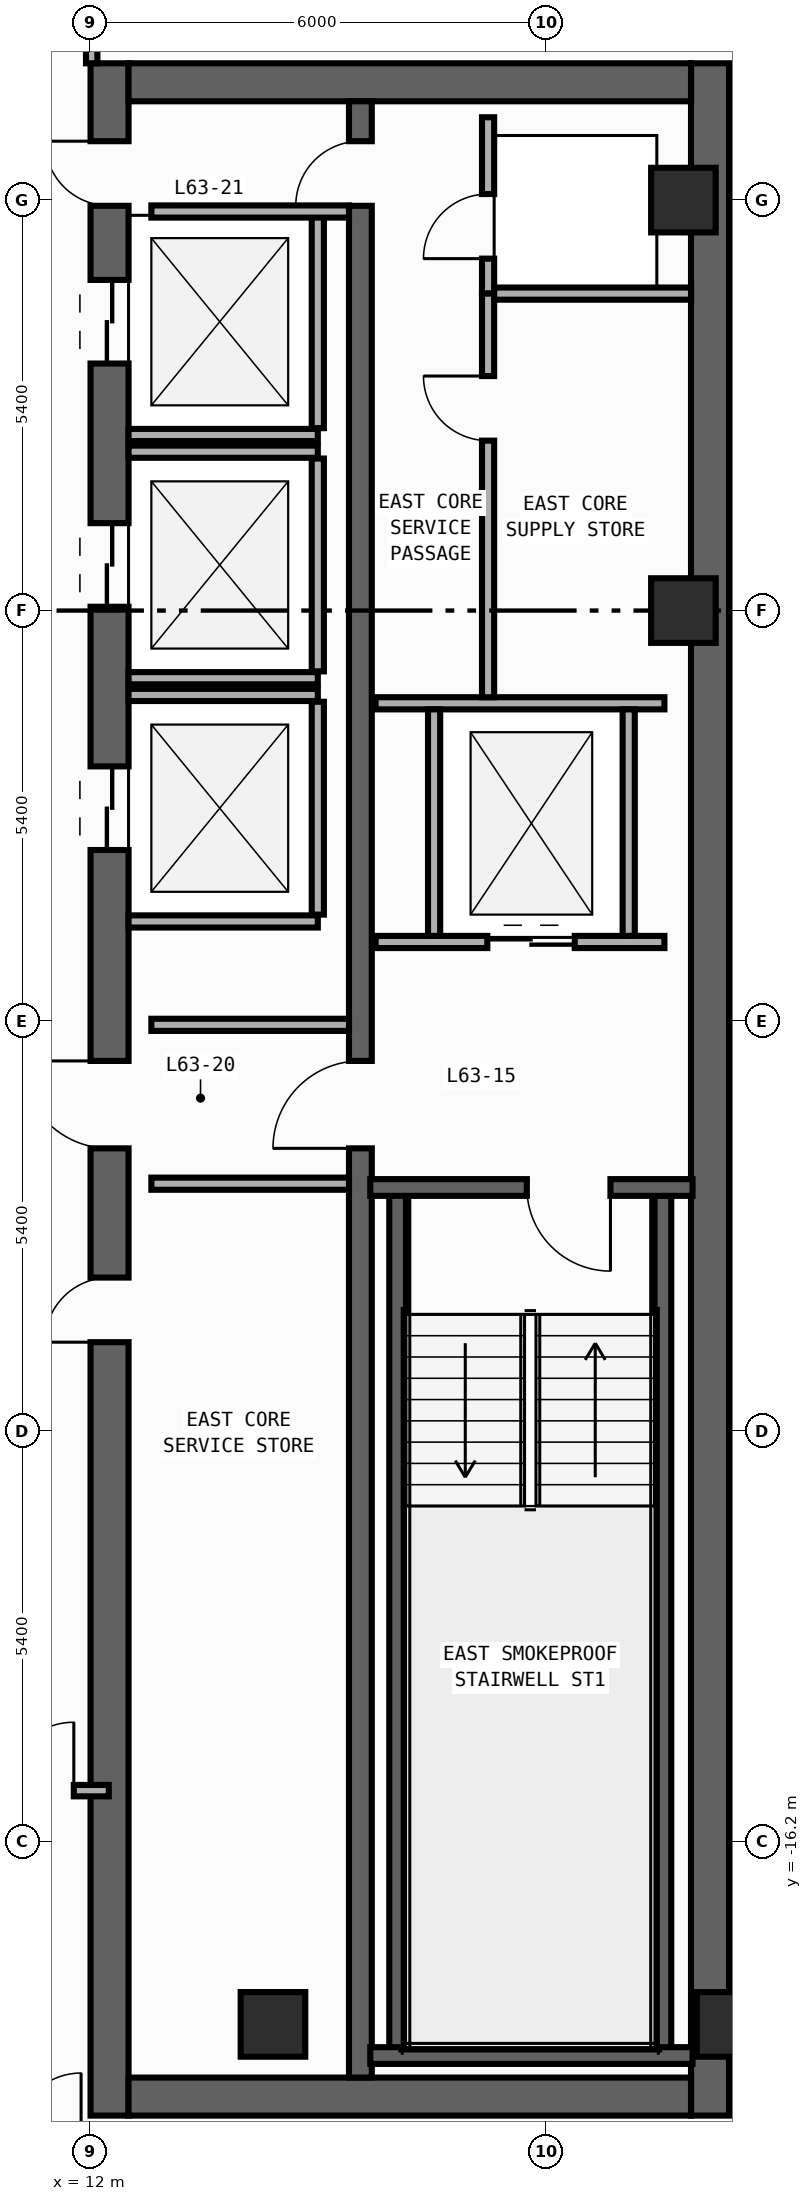
"""IFC4 building model, lengths in metres.
Left out: names, types, materials, properties, quantities, classifications, styles, units other than length and angle.
Written with IfcOpenShell. Run it as: python <this file> out.ifc"""

import sys

from ifc_helpers import new_model, si_unit, direction, frame, frame_2d, origin, origin_2d, place, context, subcontext, project, spatial, rectangle, extrude, element, fill, save


model = new_model("IFC4")
c1 = context("Model", 3, precision=1e-05, world=origin(), true_north=direction((0.0, 1.0)))
c2 = subcontext(c1, "Body", "Model", "MODEL_VIEW")
j1 = project(units=[si_unit("LENGTHUNIT", "METRE"), si_unit("PLANEANGLEUNIT", "RADIAN")], contexts=[c1])
p1 = place(None, origin())
s1 = spatial("IfcSite", under=j1, at=p1, CompositionType="ELEMENT")
p2 = place(p1, origin())
s2 = spatial("IfcBuilding", under=s1, at=p2, CompositionType="ELEMENT")
p3 = place(p2, frame((0.0, 0.0, 265.6)))
s3 = spatial("IfcBuildingStorey", under=s2, at=p3, CompositionType="ELEMENT", Elevation=265.6)
p4 = place(p3, frame((12.25, -19.8, 0.0), z_axis=(0.0, 0.0, 1.0), x_axis=(0.0, 1.0, 0.0)))
e1 = element("IfcWall", 1, at=p4, inside=s3, PredefinedType="SHEAR", context=c2, shape_type="SweptSolid", body=[
    extrude(rectangle(XDim=27.0, YDim=0.5, at=frame_2d((13.5, 0.0))), origin(), (0.0, 0.0, 1.0), 3.34),
])
p5 = place(p4, frame((23.05, 0.0, 0.0)))
e2 = element("IfcOpeningElement", 2, at=p5, cuts=e1, PredefinedType="OPENING", context=c2, shape_type="SweptSolid", body=[
    extrude(rectangle(XDim=1.1, YDim=2.2, at=frame_2d((0.55, 1.1))), frame((0.0, 0.26, 0.0), z_axis=(0.0, -1.0, 0.0), x_axis=(1.0, 0.0, 0.0)), (0.0, 0.0, 1.0), 0.52),
])
p6 = place(p4, frame((19.85, 0.0, 0.0)))
e3 = element("IfcOpeningElement", 3, at=p6, cuts=e1, PredefinedType="OPENING", context=c2, shape_type="SweptSolid", body=[
    extrude(rectangle(XDim=1.1, YDim=2.2, at=frame_2d((0.55, 1.1))), frame((0.0, 0.26, 0.0), z_axis=(0.0, -1.0, 0.0), x_axis=(1.0, 0.0, 0.0)), (0.0, 0.0, 1.0), 0.52),
])
p7 = place(p4, frame((16.65, 0.0, 0.0)))
e4 = element("IfcOpeningElement", 4, at=p7, cuts=e1, PredefinedType="OPENING", context=c2, shape_type="SweptSolid", body=[
    extrude(rectangle(XDim=1.1, YDim=2.2, at=frame_2d((0.55, 1.1))), frame((0.0, 0.26, 0.0), z_axis=(0.0, -1.0, 0.0), x_axis=(1.0, 0.0, 0.0)), (0.0, 0.0, 1.0), 0.52),
])
p8 = place(p4, frame((10.175, 0.0, 0.0)))
e5 = element("IfcOpeningElement", 5, at=p8, cuts=e1, PredefinedType="OPENING", context=c2, shape_type="SweptSolid", body=[
    extrude(rectangle(XDim=0.85, YDim=2.1, at=frame_2d((0.425, 1.05))), frame((0.0, 0.26, 0.0), z_axis=(0.0, -1.0, 0.0), x_axis=(1.0, 0.0, 0.0)), (0.0, 0.0, 1.0), 0.52),
])
p9 = place(p4, frame((12.725, 0.0, 0.0)))
e6 = element("IfcOpeningElement", 6, at=p9, cuts=e1, PredefinedType="OPENING", context=c2, shape_type="SweptSolid", body=[
    extrude(rectangle(XDim=1.15, YDim=2.2, at=frame_2d((0.575, 1.1))), frame((0.0, 0.26, 0.0), z_axis=(0.0, -1.0, 0.0), x_axis=(1.0, 0.0, 0.0)), (0.0, 0.0, 1.0), 0.52),
])
p10 = place(p4, frame((25.125, 0.0, 0.0)))
e7 = element("IfcOpeningElement", 7, at=p10, cuts=e1, PredefinedType="OPENING", context=c2, shape_type="SweptSolid", body=[
    extrude(rectangle(XDim=0.85, YDim=2.1, at=frame_2d((0.425, 1.05))), frame((0.0, 0.26, 0.0), z_axis=(0.0, -1.0, 0.0), x_axis=(1.0, 0.0, 0.0)), (0.0, 0.0, 1.0), 0.52),
])
p11 = place(p3, frame((20.15, -19.8, 0.0), z_axis=(0.0, 0.0, 1.0), x_axis=(0.0, 1.0, 0.0)))
e8 = element("IfcWall", 8, at=p11, inside=s3, PredefinedType="SHEAR", context=c2, shape_type="SweptSolid", body=[
    extrude(rectangle(XDim=27.0, YDim=0.5, at=frame_2d((13.5, 0.0))), origin(), (0.0, 0.0, 1.0), 3.34),
])
for number, where, z_axis, x_axis in (
    (9, (12.5, -19.55, 0.0), (0.0, 0.0, 1.0), (1.0, 0.0, 0.0)),
    (10, (12.5, 6.95, 0.0), (0.0, 0.0, 1.0), (1.0, 0.0, 0.0)),
):
    element("IfcWall", number, at=place(p3, frame(where, z_axis=z_axis, x_axis=x_axis)), inside=s3, PredefinedType="SHEAR", context=c2, shape_type="SweptSolid", body=[
        extrude(rectangle(XDim=7.4, YDim=0.5, at=frame_2d((3.7, 0.0))), origin(), (0.0, 0.0, 1.0), 3.34),
    ])
p12 = place(p3, frame((15.55, -19.3, 0.0), z_axis=(0.0, 0.0, 1.0), x_axis=(0.0, 1.0, 0.0)))
e11 = element("IfcWall", 11, at=p12, inside=s3, PredefinedType="SHEAR", context=c2, shape_type="SweptSolid", body=[
    extrude(rectangle(XDim=26.0, YDim=0.3, at=frame_2d((13.0, 0.0))), origin(), (0.0, 0.0, 1.0), 3.34),
])
p13 = place(p12, frame((12.225, 0.0, 0.0)))
e12 = element("IfcOpeningElement", 12, at=p13, cuts=e11, PredefinedType="OPENING", context=c2, shape_type="SweptSolid", body=[
    extrude(rectangle(XDim=1.15, YDim=2.2, at=frame_2d((0.575, 1.1))), frame((0.0, 0.16, 0.0), z_axis=(0.0, -1.0, 0.0), x_axis=(1.0, 0.0, 0.0)), (0.0, 0.0, 1.0), 0.32),
])
p14 = place(p12, frame((24.625, 0.0, 0.0)))
e13 = element("IfcOpeningElement", 13, at=p14, cuts=e11, PredefinedType="OPENING", context=c2, shape_type="SweptSolid", body=[
    extrude(rectangle(XDim=0.85, YDim=2.1, at=frame_2d((0.425, 1.05))), frame((0.0, 0.16, 0.0), z_axis=(0.0, -1.0, 0.0), x_axis=(1.0, 0.0, 0.0)), (0.0, 0.0, 1.0), 0.32),
])
for number, where, z_axis, x_axis in (
    (14, (16.04, -19.01, 0.0), (0.0, 0.0, 1.0), (0.0, 1.0, 0.0)),
    (15, (19.53, -19.01, 0.0), (0.0, 0.0, 1.0), (0.0, 1.0, 0.0)),
):
    element("IfcWall", number, at=place(p3, frame(where, z_axis=z_axis, x_axis=x_axis)), inside=s3, PredefinedType="SHEAR", context=c2, shape_type="SweptSolid", body=[
        extrude(rectangle(XDim=11.42, YDim=0.22, at=frame_2d((5.71, 0.0))), origin(), (0.0, 0.0, 1.0), 3.34),
    ])
p15 = place(p3, frame((15.68, -19.01, 0.0), z_axis=(0.0, 0.0, 1.0), x_axis=(1.0, 0.0, 0.0)))
e16 = element("IfcWall", 16, at=p15, inside=s3, PredefinedType="SHEAR", context=c2, shape_type="SweptSolid", body=[
    extrude(rectangle(XDim=4.24, YDim=0.22, at=frame_2d((2.12, 0.0))), origin(), (0.0, 0.0, 1.0), 3.34),
])
p16 = place(p3, frame((19.92, -7.59, 0.0), z_axis=(0.0, 0.0, 1.0), x_axis=(-1.0, 0.0, 0.0)))
e17 = element("IfcWall", 17, at=p16, inside=s3, PredefinedType="SHEAR", context=c2, shape_type="SweptSolid", body=[
    extrude(rectangle(XDim=4.24, YDim=0.22, at=frame_2d((2.12, 0.0))), origin(), (0.0, 0.0, 1.0), 3.34),
])
p17 = place(p16, frame((1.08, 0.0, 0.0)))
e18 = element("IfcOpeningElement", 18, at=p17, cuts=e17, PredefinedType="OPENING", context=c2, shape_type="SweptSolid", body=[
    extrude(rectangle(XDim=1.1, YDim=2.2, at=frame_2d((0.55, 1.1))), frame((0.0, 0.12, 0.0), z_axis=(0.0, -1.0, 0.0), x_axis=(1.0, 0.0, 0.0)), (0.0, 0.0, 1.0), 0.24),
])
for number, where, z_axis, x_axis in (
    (19, (20.4, -18.6, 0.0), (0.0, 0.0, 1.0), (1.0, 0.0, 0.0)),
    (20, (14.4, -18.6, 0.0), (0.0, 0.0, 1.0), (1.0, 0.0, 0.0)),
    (21, (19.8, 0.0, 0.0), (0.0, 0.0, 1.0), (1.0, 0.0, 0.0)),
    (22, (19.8, 5.4, 0.0), (0.0, 0.0, 1.0), (1.0, 0.0, 0.0)),
):
    element("IfcColumn", number, at=place(p3, frame(where, z_axis=z_axis, x_axis=x_axis)), inside=s3, PredefinedType="COLUMN", context=c2, shape_type="SweptSolid", body=[
        extrude(rectangle(XDim=0.85, YDim=0.85, at=origin_2d()), origin(), (0.0, 0.0, 1.0), 3.6),
    ])
p18 = place(p3, frame((12.5, 2.31, 0.0), z_axis=(0.0, 0.0, 1.0), x_axis=(1.0, 0.0, 0.0)))
e23 = element("IfcWall", 23, at=p18, inside=s3, PredefinedType="STANDARD", context=c2, shape_type="SweptSolid", body=[
    extrude(rectangle(XDim=2.49, YDim=0.16, at=frame_2d((1.245, 0.0))), origin(), (0.0, 0.0, 1.0), 3.34),
])
p19 = place(p3, frame((14.99, 2.4, 0.0), z_axis=(0.0, 0.0, 1.0), x_axis=(0.0, 1.0, 0.0)))
e24 = element("IfcWall", 24, at=p19, inside=s3, PredefinedType="STANDARD", context=c2, shape_type="SweptSolid", body=[
    extrude(rectangle(XDim=2.8, YDim=0.16, at=frame_2d((1.4, 0.0))), origin(), (0.0, 0.0, 1.0), 3.34),
])
for number, where, z_axis, x_axis in (
    (25, (12.5, -0.89, 0.0), (0.0, 0.0, 1.0), (1.0, 0.0, 0.0)),
    (26, (12.5, 2.09, 0.0), (0.0, 0.0, 1.0), (1.0, 0.0, 0.0)),
):
    element("IfcWall", number, at=place(p3, frame(where, z_axis=z_axis, x_axis=x_axis)), inside=s3, PredefinedType="STANDARD", context=c2, shape_type="SweptSolid", body=[
        extrude(rectangle(XDim=2.49, YDim=0.16, at=frame_2d((1.245, 0.0))), origin(), (0.0, 0.0, 1.0), 3.34),
    ])
p20 = place(p3, frame((14.99, -0.8, 0.0), z_axis=(0.0, 0.0, 1.0), x_axis=(0.0, 1.0, 0.0)))
e27 = element("IfcWall", 27, at=p20, inside=s3, PredefinedType="STANDARD", context=c2, shape_type="SweptSolid", body=[
    extrude(rectangle(XDim=2.8, YDim=0.16, at=frame_2d((1.4, 0.0))), origin(), (0.0, 0.0, 1.0), 3.34),
])
for number, where, z_axis, x_axis in (
    (28, (12.5, -4.09, 0.0), (0.0, 0.0, 1.0), (1.0, 0.0, 0.0)),
    (29, (12.5, -1.11, 0.0), (0.0, 0.0, 1.0), (1.0, 0.0, 0.0)),
):
    element("IfcWall", number, at=place(p3, frame(where, z_axis=z_axis, x_axis=x_axis)), inside=s3, PredefinedType="STANDARD", context=c2, shape_type="SweptSolid", body=[
        extrude(rectangle(XDim=2.49, YDim=0.16, at=frame_2d((1.245, 0.0))), origin(), (0.0, 0.0, 1.0), 3.34),
    ])
p21 = place(p3, frame((14.99, -4.0, 0.0), z_axis=(0.0, 0.0, 1.0), x_axis=(0.0, 1.0, 0.0)))
e30 = element("IfcWall", 30, at=p21, inside=s3, PredefinedType="STANDARD", context=c2, shape_type="SweptSolid", body=[
    extrude(rectangle(XDim=2.8, YDim=0.16, at=frame_2d((1.4, 0.0))), origin(), (0.0, 0.0, 1.0), 3.34),
])
p22 = place(p3, frame((15.75, -4.36, 0.0), z_axis=(0.0, 0.0, 1.0), x_axis=(1.0, 0.0, 0.0)))
e31 = element("IfcWall", 31, at=p22, inside=s3, PredefinedType="STANDARD", context=c2, shape_type="SweptSolid", body=[
    extrude(rectangle(XDim=3.8, YDim=0.16, at=frame_2d((1.9, 0.0))), origin(), (0.0, 0.0, 1.0), 3.34),
])
p23 = place(p22, frame((1.47, 0.0, 0.0)))
e32 = element("IfcOpeningElement", 32, at=p23, cuts=e31, PredefinedType="OPENING", context=c2, shape_type="SweptSolid", body=[
    extrude(rectangle(XDim=1.15, YDim=2.2, at=frame_2d((0.575, 1.1))), frame((0.0, 0.09, 0.0), z_axis=(0.0, -1.0, 0.0), x_axis=(1.0, 0.0, 0.0)), (0.0, 0.0, 1.0), 0.18),
])
p24 = place(p3, frame((15.75, -1.22, 0.0), z_axis=(0.0, 0.0, 1.0), x_axis=(1.0, 0.0, 0.0)))
e33 = element("IfcWall", 33, at=p24, inside=s3, PredefinedType="STANDARD", context=c2, shape_type="SweptSolid", body=[
    extrude(rectangle(XDim=3.8, YDim=0.16, at=frame_2d((1.9, 0.0))), origin(), (0.0, 0.0, 1.0), 3.34),
])
for number, where, z_axis, x_axis in (
    (34, (16.52, -4.28, 0.0), (0.0, 0.0, 1.0), (0.0, 1.0, 0.0)),
    (35, (19.08, -4.28, 0.0), (0.0, 0.0, 1.0), (0.0, 1.0, 0.0)),
):
    element("IfcWall", number, at=place(p3, frame(where, z_axis=z_axis, x_axis=x_axis)), inside=s3, PredefinedType="STANDARD", context=c2, shape_type="SweptSolid", body=[
        extrude(rectangle(XDim=2.98, YDim=0.16, at=frame_2d((1.49, 0.0))), origin(), (0.0, 0.0, 1.0), 3.34),
    ])
for number, where, z_axis, x_axis in (
    (36, (12.8, -5.45, 0.0), (0.0, 0.0, 1.0), (1.0, 0.0, 0.0)),
    (37, (12.8, -7.54, 0.0), (0.0, 0.0, 1.0), (1.0, 0.0, 0.0)),
    (38, (12.8, 5.25, 0.0), (0.0, 0.0, 1.0), (1.0, 0.0, 0.0)),
):
    element("IfcWall", number, at=place(p3, frame(where, z_axis=z_axis, x_axis=x_axis)), inside=s3, PredefinedType="STANDARD", context=c2, shape_type="SweptSolid", body=[
        extrude(rectangle(XDim=2.6, YDim=0.16, at=frame_2d((1.3, 0.0))), origin(), (0.0, 0.0, 1.0), 3.34),
    ])
p25 = place(p3, frame((17.23, 4.17, 0.0), z_axis=(0.0, 0.0, 1.0), x_axis=(0.0, 1.0, 0.0)))
e39 = element("IfcWall", 39, at=p25, inside=s3, PredefinedType="PARTITIONING", context=c2, shape_type="SweptSolid", body=[
    extrude(rectangle(XDim=2.32, YDim=0.16, at=frame_2d((1.16, 0.0))), origin(), (0.0, 0.0, 1.0), 3.34),
])
p26 = place(p25, frame((0.46, 0.0, 0.0)))
e40 = element("IfcOpeningElement", 40, at=p26, cuts=e39, PredefinedType="OPENING", context=c2, shape_type="SweptSolid", body=[
    extrude(rectangle(XDim=0.85, YDim=2.1, at=frame_2d((0.425, 1.05))), frame((0.0, 0.09, 0.0), z_axis=(0.0, -1.0, 0.0), x_axis=(1.0, 0.0, 0.0)), (0.0, 0.0, 1.0), 0.18),
])
p27 = place(p3, frame((17.23, -1.14, 0.0), z_axis=(0.0, 0.0, 1.0), x_axis=(0.0, 1.0, 0.0)))
e41 = element("IfcWall", 41, at=p27, inside=s3, PredefinedType="PARTITIONING", context=c2, shape_type="SweptSolid", body=[
    extrude(rectangle(XDim=5.31, YDim=0.16, at=frame_2d((2.655, 0.0))), origin(), (0.0, 0.0, 1.0), 3.34),
])
p28 = place(p27, frame((3.375, 0.0, 0.0)))
e42 = element("IfcOpeningElement", 42, at=p28, cuts=e41, PredefinedType="OPENING", context=c2, shape_type="SweptSolid", body=[
    extrude(rectangle(XDim=0.85, YDim=2.1, at=frame_2d((0.425, 1.05))), frame((0.0, 0.09, 0.0), z_axis=(0.0, -1.0, 0.0), x_axis=(1.0, 0.0, 0.0)), (0.0, 0.0, 1.0), 0.18),
])
p29 = place(p3, frame((17.31, 4.17, 0.0), z_axis=(0.0, 0.0, 1.0), x_axis=(1.0, 0.0, 0.0)))
e43 = element("IfcWall", 43, at=p29, inside=s3, PredefinedType="PARTITIONING", context=c2, shape_type="SweptSolid", body=[
    extrude(rectangle(XDim=2.59, YDim=0.16, at=frame_2d((1.295, 0.0))), origin(), (0.0, 0.0, 1.0), 3.34),
])
p30 = place(p3, frame((12.015, 7.2, 0.0), z_axis=(0.0, 0.0, 1.0), x_axis=(0.0, 1.0, 0.0)))
e44 = element("IfcWall", 44, at=p30, inside=s3, PredefinedType="PARTITIONING", context=c2, shape_type="SweptSolid", body=[
    extrude(rectangle(XDim=6.52, YDim=0.15, at=frame_2d((3.26, 0.0))), origin(), (0.0, 0.0, 1.0), 3.34),
])
p31 = place(p30, frame((0.67, 0.0, 0.0)))
e45 = element("IfcOpeningElement", 45, at=p31, cuts=e44, PredefinedType="OPENING", context=c2, shape_type="SweptSolid", body=[
    extrude(rectangle(XDim=0.9, YDim=2.15, at=frame_2d((0.45, 1.075))), frame((0.0, 0.085, 0.0), z_axis=(0.0, -1.0, 0.0), x_axis=(1.0, 0.0, 0.0)), (0.0, 0.0, 1.0), 0.17),
])
p32 = place(p3, frame((1.19, -15.525, 0.0), z_axis=(0.0, 0.0, 1.0), x_axis=(1.0, 0.0, 0.0)))
e46 = element("IfcWall", 46, at=p32, inside=s3, PredefinedType="PARTITIONING", context=c2, shape_type="SweptSolid", body=[
    extrude(rectangle(XDim=11.05, YDim=0.15, at=frame_2d((5.525, 0.0))), origin(), (0.0, 0.0, 1.0), 3.34),
])
p33 = place(p32, frame((9.69, 0.0, 0.0)))
e47 = element("IfcOpeningElement", 47, at=p33, cuts=e46, PredefinedType="OPENING", context=c2, shape_type="SweptSolid", body=[
    extrude(rectangle(XDim=0.9, YDim=2.15, at=frame_2d((0.45, 1.075))), frame((0.0, 0.085, 0.0), z_axis=(0.0, -1.0, 0.0), x_axis=(1.0, 0.0, 0.0)), (0.0, 0.0, 1.0), 0.17),
])
p34 = place(p17, origin())
e48 = element("IfcDoor", 48, at=p34, inside=s3, OperationType="SINGLE_SWING_LEFT", PredefinedType="DOOR", context=c2, shape_type="SweptSolid", body=[
    extrude(rectangle(XDim=1.1, YDim=2.2, at=frame_2d((0.55, 1.1))), frame((0.0, 0.025, 0.0), z_axis=(0.0, -1.0, 0.0), x_axis=(1.0, 0.0, 0.0)), (0.0, 0.0, 1.0), 0.05),
])
fill(e18, e48)
p35 = place(p5, origin())
e49 = element("IfcDoor", 49, at=p35, inside=s3, OperationType="DOUBLE_DOOR_SLIDING", PredefinedType="DOOR", context=c2, shape_type="SweptSolid", body=[
    extrude(rectangle(XDim=1.1, YDim=2.2, at=frame_2d((0.55, 1.1))), frame((0.0, 0.025, 0.0), z_axis=(0.0, -1.0, 0.0), x_axis=(1.0, 0.0, 0.0)), (0.0, 0.0, 1.0), 0.05),
])
fill(e2, e49)
p36 = place(p6, origin())
e50 = element("IfcDoor", 50, at=p36, inside=s3, OperationType="DOUBLE_DOOR_SLIDING", PredefinedType="DOOR", context=c2, shape_type="SweptSolid", body=[
    extrude(rectangle(XDim=1.1, YDim=2.2, at=frame_2d((0.55, 1.1))), frame((0.0, 0.025, 0.0), z_axis=(0.0, -1.0, 0.0), x_axis=(1.0, 0.0, 0.0)), (0.0, 0.0, 1.0), 0.05),
])
fill(e3, e50)
p37 = place(p7, origin())
e51 = element("IfcDoor", 51, at=p37, inside=s3, OperationType="DOUBLE_DOOR_SLIDING", PredefinedType="DOOR", context=c2, shape_type="SweptSolid", body=[
    extrude(rectangle(XDim=1.1, YDim=2.2, at=frame_2d((0.55, 1.1))), frame((0.0, 0.025, 0.0), z_axis=(0.0, -1.0, 0.0), x_axis=(1.0, 0.0, 0.0)), (0.0, 0.0, 1.0), 0.05),
])
fill(e4, e51)
p38 = place(p8, origin())
e52 = element("IfcDoor", 52, at=p38, inside=s3, OperationType="SINGLE_SWING_LEFT", PredefinedType="DOOR", context=c2, shape_type="SweptSolid", body=[
    extrude(rectangle(XDim=0.85, YDim=2.1, at=frame_2d((0.425, 1.05))), frame((0.0, 0.025, 0.0), z_axis=(0.0, -1.0, 0.0), x_axis=(1.0, 0.0, 0.0)), (0.0, 0.0, 1.0), 0.05),
])
fill(e5, e52)
p39 = place(p9, origin())
e53 = element("IfcDoor", 53, at=p39, inside=s3, OperationType="SINGLE_SWING_RIGHT", PredefinedType="DOOR", context=c2, shape_type="SweptSolid", body=[
    extrude(rectangle(XDim=1.15, YDim=2.2, at=frame_2d((0.575, 1.1))), frame((0.0, 0.025, 0.0), z_axis=(0.0, -1.0, 0.0), x_axis=(1.0, 0.0, 0.0)), (0.0, 0.0, 1.0), 0.05),
])
fill(e6, e53)
p40 = place(p13, origin())
e54 = element("IfcDoor", 54, at=p40, inside=s3, OperationType="SINGLE_SWING_LEFT", PredefinedType="DOOR", context=c2, shape_type="SweptSolid", body=[
    extrude(rectangle(XDim=1.15, YDim=2.2, at=frame_2d((0.575, 1.1))), frame((0.0, 0.025, 0.0), z_axis=(0.0, -1.0, 0.0), x_axis=(1.0, 0.0, 0.0)), (0.0, 0.0, 1.0), 0.05),
])
fill(e12, e54)
p41 = place(p10, origin())
e55 = element("IfcDoor", 55, at=p41, inside=s3, OperationType="SINGLE_SWING_RIGHT", PredefinedType="DOOR", context=c2, shape_type="SweptSolid", body=[
    extrude(rectangle(XDim=0.85, YDim=2.1, at=frame_2d((0.425, 1.05))), frame((0.0, 0.025, 0.0), z_axis=(0.0, -1.0, 0.0), x_axis=(1.0, 0.0, 0.0)), (0.0, 0.0, 1.0), 0.05),
])
fill(e7, e55)
p42 = place(p14, origin())
e56 = element("IfcDoor", 56, at=p42, inside=s3, OperationType="SINGLE_SWING_LEFT", PredefinedType="DOOR", context=c2, shape_type="SweptSolid", body=[
    extrude(rectangle(XDim=0.85, YDim=2.1, at=frame_2d((0.425, 1.05))), frame((0.0, 0.025, 0.0), z_axis=(0.0, -1.0, 0.0), x_axis=(1.0, 0.0, 0.0)), (0.0, 0.0, 1.0), 0.05),
])
fill(e13, e56)
p43 = place(p23, origin())
e57 = element("IfcDoor", 57, at=p43, inside=s3, OperationType="DOUBLE_DOOR_SLIDING", PredefinedType="DOOR", context=c2, shape_type="SweptSolid", body=[
    extrude(rectangle(XDim=1.15, YDim=2.2, at=frame_2d((0.575, 1.1))), frame((0.0, 0.025, 0.0), z_axis=(0.0, -1.0, 0.0), x_axis=(1.0, 0.0, 0.0)), (0.0, 0.0, 1.0), 0.05),
])
fill(e32, e57)
p44 = place(p26, origin())
e58 = element("IfcDoor", 58, at=p44, inside=s3, OperationType="SINGLE_SWING_LEFT", PredefinedType="DOOR", context=c2, shape_type="SweptSolid", body=[
    extrude(rectangle(XDim=0.85, YDim=2.1, at=frame_2d((0.425, 1.05))), frame((0.0, 0.025, 0.0), z_axis=(0.0, -1.0, 0.0), x_axis=(1.0, 0.0, 0.0)), (0.0, 0.0, 1.0), 0.05),
])
fill(e40, e58)
p45 = place(p28, origin())
e59 = element("IfcDoor", 59, at=p45, inside=s3, OperationType="SINGLE_SWING_RIGHT", PredefinedType="DOOR", context=c2, shape_type="SweptSolid", body=[
    extrude(rectangle(XDim=0.85, YDim=2.1, at=frame_2d((0.425, 1.05))), frame((0.0, 0.025, 0.0), z_axis=(0.0, -1.0, 0.0), x_axis=(1.0, 0.0, 0.0)), (0.0, 0.0, 1.0), 0.05),
])
fill(e42, e59)
p46 = place(p33, origin())
e60 = element("IfcDoor", 60, at=p46, inside=s3, OperationType="SINGLE_SWING_RIGHT", PredefinedType="DOOR", context=c2, shape_type="SweptSolid", body=[
    extrude(rectangle(XDim=0.9, YDim=2.15, at=frame_2d((0.45, 1.075))), frame((0.0, 0.025, 0.0), z_axis=(0.0, -1.0, 0.0), x_axis=(1.0, 0.0, 0.0)), (0.0, 0.0, 1.0), 0.05),
])
fill(e47, e60)
save(model, sys.argv[1])
